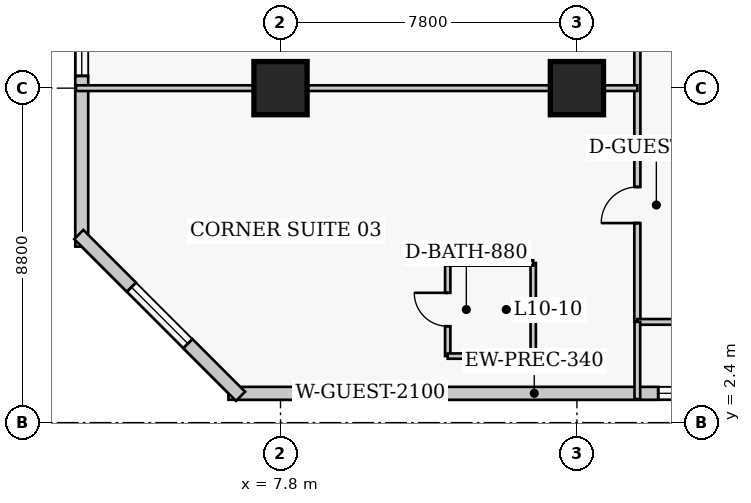
"""IFC4 building model, lengths in metres.
Left out: names, types, materials, properties, quantities, classifications, styles, units other than length and angle.
Written with IfcOpenShell. Run it as: python <this file> out.ifc"""

import sys

from ifc_helpers import new_model, si_unit, direction, frame, frame_2d, origin, origin_2d, place, context, subcontext, project, spatial, rectangle, extrude, element, fill, save


model = new_model("IFC4")
c1 = context("Model", 3, precision=1e-05, world=origin(), true_north=direction((0.0, 1.0)))
c2 = subcontext(c1, "Body", "Model", "MODEL_VIEW")
j1 = project(units=[si_unit("LENGTHUNIT", "METRE"), si_unit("PLANEANGLEUNIT", "RADIAN")], contexts=[c1])
p1 = place(None, origin())
s1 = spatial("IfcSite", under=j1, at=p1, CompositionType="ELEMENT")
p2 = place(p1, origin())
s2 = spatial("IfcBuilding", under=s1, at=p2, CompositionType="ELEMENT")
p3 = place(p2, frame((0.0, 0.0, 45.0)))
s3 = spatial("IfcBuildingStorey", under=s2, at=p3, CompositionType="ELEMENT", Elevation=45.0)
for number, where, z_axis, x_axis in (
    (1, (7.8, 11.2, 0.0), (0.0, 0.0, 1.0), (1.0, 0.0, 0.0)),
    (2, (15.6, 11.2, 0.0), (0.0, 0.0, 1.0), (1.0, 0.0, 0.0)),
):
    element("IfcColumn", number, at=place(p3, frame(where, z_axis=z_axis, x_axis=x_axis)), inside=s3, PredefinedType="COLUMN", context=c2, shape_type="SweptSolid", body=[
        extrude(rectangle(XDim=1.4, YDim=1.4, at=origin_2d()), origin(), (0.0, 0.0, 1.0), 3.8),
    ])
p4 = place(p3, frame((6.43, 3.17, 0.0), z_axis=(0.0, 0.0, 1.0), x_axis=(1.0, 0.0, 0.0)))
e3 = element("IfcWall", 3, at=p4, inside=s3, PredefinedType="SOLIDWALL", context=c2, shape_type="SweptSolid", body=[
    extrude(rectangle(XDim=29.89, YDim=0.34, at=frame_2d((14.945, 0.0))), origin(), (0.0, 0.0, 1.0), 3.54),
])
p5 = place(p4, frame((20.92, 0.0, 0.0)))
e4 = element("IfcOpeningElement", 4, at=p5, cuts=e3, PredefinedType="OPENING", context=c2, shape_type="SweptSolid", body=[
    extrude(rectangle(XDim=1.4, YDim=2.15, at=frame_2d((0.7, 1.075))), frame((0.0, 0.18, 0.0), z_axis=(0.0, -1.0, 0.0), x_axis=(1.0, 0.0, 0.0)), (0.0, 0.0, 1.0), 0.36),
])
p6 = place(p4, frame((2.686, 0.0, 0.85)))
e5 = element("IfcOpeningElement", 5, at=p6, cuts=e3, PredefinedType="OPENING", context=c2, shape_type="SweptSolid", body=[
    extrude(rectangle(XDim=2.1, YDim=1.85, at=frame_2d((1.05, 0.925))), frame((0.0, 0.18, 0.0), z_axis=(0.0, -1.0, 0.0), x_axis=(1.0, 0.0, 0.0)), (0.0, 0.0, 1.0), 0.36),
])
p7 = place(p4, frame((11.309, 0.0, 0.85)))
e6 = element("IfcOpeningElement", 6, at=p7, cuts=e3, PredefinedType="OPENING", context=c2, shape_type="SweptSolid", body=[
    extrude(rectangle(XDim=2.1, YDim=1.85, at=frame_2d((1.05, 0.925))), frame((0.0, 0.18, 0.0), z_axis=(0.0, -1.0, 0.0), x_axis=(1.0, 0.0, 0.0)), (0.0, 0.0, 1.0), 0.36),
])
p8 = place(p4, frame((17.631, 0.0, 0.85)))
e7 = element("IfcOpeningElement", 7, at=p8, cuts=e3, PredefinedType="OPENING", context=c2, shape_type="SweptSolid", body=[
    extrude(rectangle(XDim=2.1, YDim=1.85, at=frame_2d((1.05, 0.925))), frame((0.0, 0.18, 0.0), z_axis=(0.0, -1.0, 0.0), x_axis=(1.0, 0.0, 0.0)), (0.0, 0.0, 1.0), 0.36),
])
p9 = place(p4, frame((25.104, 0.0, 0.85)))
e8 = element("IfcOpeningElement", 8, at=p9, cuts=e3, PredefinedType="OPENING", context=c2, shape_type="SweptSolid", body=[
    extrude(rectangle(XDim=2.1, YDim=1.85, at=frame_2d((1.05, 0.925))), frame((0.0, 0.18, 0.0), z_axis=(0.0, -1.0, 0.0), x_axis=(1.0, 0.0, 0.0)), (0.0, 0.0, 1.0), 0.36),
])
p10 = place(p3, frame((2.57, 42.17, 0.0), z_axis=(0.0, 0.0, 1.0), x_axis=(0.0, -1.0, 0.0)))
e9 = element("IfcWall", 9, at=p10, inside=s3, PredefinedType="SOLIDWALL", context=c2, shape_type="SweptSolid", body=[
    extrude(rectangle(XDim=35.14, YDim=0.34, at=frame_2d((17.57, 0.0))), origin(), (0.0, 0.0, 1.0), 3.54),
])
p11 = place(p10, frame((3.343, 0.0, 0.85)))
e10 = element("IfcOpeningElement", 10, at=p11, cuts=e9, PredefinedType="OPENING", context=c2, shape_type="SweptSolid", body=[
    extrude(rectangle(XDim=2.1, YDim=1.85, at=frame_2d((1.05, 0.925))), frame((0.0, 0.18, 0.0), z_axis=(0.0, -1.0, 0.0), x_axis=(1.0, 0.0, 0.0)), (0.0, 0.0, 1.0), 0.36),
])
p12 = place(p10, frame((10.978, 0.0, 0.85)))
e11 = element("IfcOpeningElement", 11, at=p12, cuts=e9, PredefinedType="OPENING", context=c2, shape_type="SweptSolid", body=[
    extrude(rectangle(XDim=2.1, YDim=1.85, at=frame_2d((1.05, 0.925))), frame((0.0, 0.18, 0.0), z_axis=(0.0, -1.0, 0.0), x_axis=(1.0, 0.0, 0.0)), (0.0, 0.0, 1.0), 0.36),
])
p13 = place(p10, frame((19.762, 0.0, 0.85)))
e12 = element("IfcOpeningElement", 12, at=p13, cuts=e9, PredefinedType="OPENING", context=c2, shape_type="SweptSolid", body=[
    extrude(rectangle(XDim=2.1, YDim=1.85, at=frame_2d((1.05, 0.925))), frame((0.0, 0.18, 0.0), z_axis=(0.0, -1.0, 0.0), x_axis=(1.0, 0.0, 0.0)), (0.0, 0.0, 1.0), 0.36),
])
p14 = place(p10, frame((28.548, 0.0, 0.85)))
e13 = element("IfcOpeningElement", 13, at=p14, cuts=e9, PredefinedType="OPENING", context=c2, shape_type="SweptSolid", body=[
    extrude(rectangle(XDim=2.1, YDim=1.85, at=frame_2d((1.05, 0.925))), frame((0.0, 0.18, 0.0), z_axis=(0.0, -1.0, 0.0), x_axis=(1.0, 0.0, 0.0)), (0.0, 0.0, 1.0), 0.36),
])
p15 = place(p3, frame((2.492, 7.348, 0.0), z_axis=(0.0, 0.0, 1.0), x_axis=(0.707106781187, -0.707106781187, 0.0)))
e14 = element("IfcWall", 14, at=p15, inside=s3, PredefinedType="SOLIDWALL", context=c2, shape_type="SweptSolid", body=[
    extrude(rectangle(XDim=6.02, YDim=0.34, at=frame_2d((3.01, 0.0))), origin(), (0.0, 0.0, 1.0), 3.54),
])
p16 = place(p15, frame((1.96, 0.0, 0.85)))
e15 = element("IfcOpeningElement", 15, at=p16, cuts=e14, PredefinedType="OPENING", context=c2, shape_type="SweptSolid", body=[
    extrude(rectangle(XDim=2.1, YDim=1.85, at=frame_2d((1.05, 0.925))), frame((0.0, 0.18, 0.0), z_axis=(0.0, -1.0, 0.0), x_axis=(1.0, 0.0, 0.0)), (0.0, 0.0, 1.0), 0.36),
])
p17 = place(p3, frame((17.19, 5.05, 0.0), z_axis=(0.0, 0.0, 1.0), x_axis=(0.0, 1.0, 0.0)))
e16 = element("IfcWall", 16, at=p17, inside=s3, PredefinedType="PARTITIONING", context=c2, shape_type="SweptSolid", body=[
    extrude(rectangle(XDim=35.6, YDim=0.16, at=frame_2d((17.8, 0.0))), origin(), (0.0, 0.0, 1.0), 3.54),
])
p18 = place(p17, frame((2.6, 0.0, 0.0)))
e17 = element("IfcOpeningElement", 17, at=p18, cuts=e16, PredefinedType="OPENING", context=c2, shape_type="SweptSolid", body=[
    extrude(rectangle(XDim=0.95, YDim=2.1, at=frame_2d((0.475, 1.05))), frame((0.0, 0.09, 0.0), z_axis=(0.0, -1.0, 0.0), x_axis=(1.0, 0.0, 0.0)), (0.0, 0.0, 1.0), 0.18),
])
p19 = place(p17, frame((10.075, 0.0, 0.0)))
e18 = element("IfcOpeningElement", 18, at=p19, cuts=e16, PredefinedType="OPENING", context=c2, shape_type="SweptSolid", body=[
    extrude(rectangle(XDim=0.95, YDim=2.1, at=frame_2d((0.475, 1.05))), frame((0.0, 0.09, 0.0), z_axis=(0.0, -1.0, 0.0), x_axis=(1.0, 0.0, 0.0)), (0.0, 0.0, 1.0), 0.18),
])
p20 = place(p17, frame((18.875, 0.0, 0.0)))
e19 = element("IfcOpeningElement", 19, at=p20, cuts=e16, PredefinedType="OPENING", context=c2, shape_type="SweptSolid", body=[
    extrude(rectangle(XDim=0.95, YDim=2.1, at=frame_2d((0.475, 1.05))), frame((0.0, 0.09, 0.0), z_axis=(0.0, -1.0, 0.0), x_axis=(1.0, 0.0, 0.0)), (0.0, 0.0, 1.0), 0.18),
])
p21 = place(p17, frame((26.925, 0.0, 0.0)))
e20 = element("IfcOpeningElement", 20, at=p21, cuts=e16, PredefinedType="OPENING", context=c2, shape_type="SweptSolid", body=[
    extrude(rectangle(XDim=0.95, YDim=2.1, at=frame_2d((0.475, 1.05))), frame((0.0, 0.09, 0.0), z_axis=(0.0, -1.0, 0.0), x_axis=(1.0, 0.0, 0.0)), (0.0, 0.0, 1.0), 0.18),
])
p22 = place(p17, frame((34.16, 0.0, 0.0)))
e21 = element("IfcOpeningElement", 21, at=p22, cuts=e16, PredefinedType="OPENING", context=c2, shape_type="SweptSolid", body=[
    extrude(rectangle(XDim=1.0, YDim=2.15, at=frame_2d((0.5, 1.075))), frame((0.0, 0.09, 0.0), z_axis=(0.0, -1.0, 0.0), x_axis=(1.0, 0.0, 0.0)), (0.0, 0.0, 1.0), 0.18),
])
p23 = place(p3, frame((17.19, 5.05, 0.0), z_axis=(0.0, 0.0, 1.0), x_axis=(1.0, 0.0, 0.0)))
e22 = element("IfcWall", 22, at=p23, inside=s3, PredefinedType="PARTITIONING", context=c2, shape_type="SweptSolid", body=[
    extrude(rectangle(XDim=2.22, YDim=0.15, at=frame_2d((1.11, 0.0))), origin(), (0.0, 0.0, 1.0), 3.54),
])
p24 = place(p3, frame((17.19, 3.02, 0.0), z_axis=(0.0, 0.0, 1.0), x_axis=(0.0, 1.0, 0.0)))
e23 = element("IfcWall", 23, at=p24, inside=s3, PredefinedType="PARTITIONING", context=c2, shape_type="SweptSolid", body=[
    extrude(rectangle(XDim=2.03, YDim=0.15, at=frame_2d((1.015, 0.0))), origin(), (0.0, 0.0, 1.0), 3.54),
])
p25 = place(p3, frame((12.2, 4.15, 0.0), z_axis=(0.0, 0.0, 1.0), x_axis=(0.0, 1.0, 0.0)))
e24 = element("IfcWall", 24, at=p25, inside=s3, PredefinedType="PLUMBINGWALL", context=c2, shape_type="SweptSolid", body=[
    extrude(rectangle(XDim=2.45, YDim=0.14, at=frame_2d((1.225, 0.0))), origin(), (0.0, 0.0, 1.0), 3.54),
])
p26 = place(p25, frame((0.785, 0.0, 0.0)))
e25 = element("IfcOpeningElement", 25, at=p26, cuts=e24, PredefinedType="OPENING", context=c2, shape_type="SweptSolid", body=[
    extrude(rectangle(XDim=0.88, YDim=2.05, at=frame_2d((0.44, 1.025))), frame((0.0, 0.08, 0.0), z_axis=(0.0, -1.0, 0.0), x_axis=(1.0, 0.0, 0.0)), (0.0, 0.0, 1.0), 0.16),
])
p27 = place(p3, frame((14.45, 4.15, 0.0), z_axis=(0.0, 0.0, 1.0), x_axis=(0.0, 1.0, 0.0)))
e26 = element("IfcWall", 26, at=p27, inside=s3, PredefinedType="PLUMBINGWALL", context=c2, shape_type="SweptSolid", body=[
    extrude(rectangle(XDim=2.45, YDim=0.14, at=frame_2d((1.225, 0.0))), origin(), (0.0, 0.0, 1.0), 3.54),
])
for number, where, z_axis, x_axis in (
    (27, (12.2, 4.15, 0.0), (0.0, 0.0, 1.0), (1.0, 0.0, 0.0)),
    (28, (12.2, 6.6, 0.0), (0.0, 0.0, 1.0), (1.0, 0.0, 0.0)),
):
    element("IfcWall", number, at=place(p3, frame(where, z_axis=z_axis, x_axis=x_axis)), inside=s3, PredefinedType="PLUMBINGWALL", context=c2, shape_type="SweptSolid", body=[
        extrude(rectangle(XDim=2.25, YDim=0.14, at=frame_2d((1.125, 0.0))), origin(), (0.0, 0.0, 1.0), 3.54),
    ])
p28 = place(p3, frame((2.42, 11.2, 0.0), z_axis=(0.0, 0.0, 1.0), x_axis=(1.0, 0.0, 0.0)))
e29 = element("IfcWall", 29, at=p28, inside=s3, PredefinedType="PARTITIONING", context=c2, shape_type="SweptSolid", body=[
    extrude(rectangle(XDim=14.77, YDim=0.15, at=frame_2d((7.385, 0.0))), origin(), (0.0, 0.0, 1.0), 2.593),
])
p29 = place(p6, origin())
e30 = element("IfcWindow", 30, at=p29, inside=s3, PartitioningType="SINGLE_PANEL", PredefinedType="WINDOW", context=c2, shape_type="SweptSolid", body=[
    extrude(rectangle(XDim=2.1, YDim=1.85, at=frame_2d((1.05, 0.925))), frame((0.0, 0.03, 0.0), z_axis=(0.0, -1.0, 0.0), x_axis=(1.0, 0.0, 0.0)), (0.0, 0.0, 1.0), 0.06),
])
fill(e5, e30)
p30 = place(p7, origin())
e31 = element("IfcWindow", 31, at=p30, inside=s3, PartitioningType="SINGLE_PANEL", PredefinedType="WINDOW", context=c2, shape_type="SweptSolid", body=[
    extrude(rectangle(XDim=2.1, YDim=1.85, at=frame_2d((1.05, 0.925))), frame((0.0, 0.03, 0.0), z_axis=(0.0, -1.0, 0.0), x_axis=(1.0, 0.0, 0.0)), (0.0, 0.0, 1.0), 0.06),
])
fill(e6, e31)
p31 = place(p14, origin())
e32 = element("IfcWindow", 32, at=p31, inside=s3, PartitioningType="SINGLE_PANEL", PredefinedType="WINDOW", context=c2, shape_type="SweptSolid", body=[
    extrude(rectangle(XDim=2.1, YDim=1.85, at=frame_2d((1.05, 0.925))), frame((0.0, 0.03, 0.0), z_axis=(0.0, -1.0, 0.0), x_axis=(1.0, 0.0, 0.0)), (0.0, 0.0, 1.0), 0.06),
])
fill(e13, e32)
p32 = place(p16, origin())
e33 = element("IfcWindow", 33, at=p32, inside=s3, PartitioningType="SINGLE_PANEL", PredefinedType="WINDOW", context=c2, shape_type="SweptSolid", body=[
    extrude(rectangle(XDim=2.1, YDim=1.85, at=frame_2d((1.05, 0.925))), frame((0.0, 0.03, 0.0), z_axis=(0.0, -1.0, 0.0), x_axis=(1.0, 0.0, 0.0)), (0.0, 0.0, 1.0), 0.06),
])
fill(e15, e33)
p33 = place(p26, origin())
e34 = element("IfcDoor", 34, at=p33, inside=s3, OperationType="SINGLE_SWING_RIGHT", PredefinedType="DOOR", context=c2, shape_type="SweptSolid", body=[
    extrude(rectangle(XDim=0.88, YDim=2.05, at=frame_2d((0.44, 1.025))), frame((0.0, 0.025, 0.0), z_axis=(0.0, -1.0, 0.0), x_axis=(1.0, 0.0, 0.0)), (0.0, 0.0, 1.0), 0.05),
])
fill(e25, e34)
p34 = place(p18, origin())
e35 = element("IfcDoor", 35, at=p34, inside=s3, OperationType="SINGLE_SWING_LEFT", PredefinedType="DOOR", context=c2, shape_type="SweptSolid", body=[
    extrude(rectangle(XDim=0.95, YDim=2.1, at=frame_2d((0.475, 1.05))), frame((0.0, 0.025, 0.0), z_axis=(0.0, -1.0, 0.0), x_axis=(1.0, 0.0, 0.0)), (0.0, 0.0, 1.0), 0.05),
])
fill(e17, e35)
save(model, sys.argv[1])
